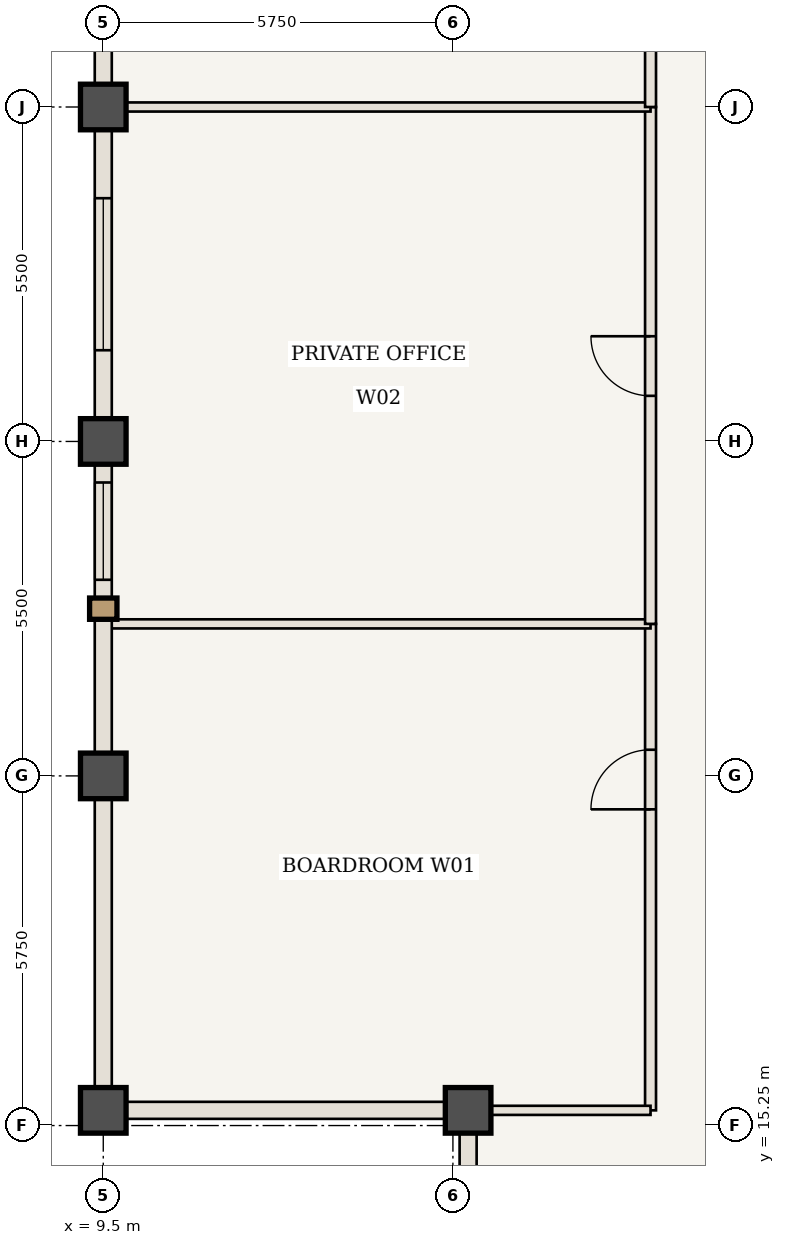
"""IFC4 building model, lengths in metres.
Left out: names, types, materials, properties, quantities, classifications, styles, units other than length and angle.
Written with IfcOpenShell. Run it as: python <this file> out.ifc"""

import sys

from ifc_helpers import new_model, si_unit, direction, frame, frame_2d, origin, origin_2d, place, context, subcontext, project, spatial, rectangle, extrude, element, fill, save


model = new_model("IFC4")
c1 = context("Model", 3, precision=1e-05, world=origin(), true_north=direction((0.0, 1.0)))
c2 = subcontext(c1, "Body", "Model", "MODEL_VIEW")
j1 = project(units=[si_unit("LENGTHUNIT", "METRE"), si_unit("PLANEANGLEUNIT", "RADIAN")], contexts=[c1])
p1 = place(None, origin())
s1 = spatial("IfcSite", under=j1, at=p1, CompositionType="ELEMENT")
p2 = place(p1, origin())
s2 = spatial("IfcBuilding", under=s1, at=p2, CompositionType="ELEMENT")
p3 = place(p2, frame((0.0, 0.0, 266.0)))
s3 = spatial("IfcBuildingStorey", under=s2, at=p3, CompositionType="ELEMENT", Elevation=266.0)
for number, where, z_axis, x_axis in (
    (1, (15.5, 15.5, 0.0), (0.0, 0.0, 1.0), (1.0, 0.0, 0.0)),
    (2, (9.5, 15.5, 0.0), (0.0, 0.0, 1.0), (1.0, 0.0, 0.0)),
    (3, (9.5, 21.0, 0.0), (0.0, 0.0, 1.0), (1.0, 0.0, 0.0)),
    (4, (9.5, 26.5, 0.0), (0.0, 0.0, 1.0), (1.0, 0.0, 0.0)),
    (5, (9.5, 32.0, 0.0), (0.0, 0.0, 1.0), (1.0, 0.0, 0.0)),
):
    element("IfcColumn", number, at=place(p3, frame(where, z_axis=z_axis, x_axis=x_axis)), inside=s3, PredefinedType="COLUMN", context=c2, shape_type="SweptSolid", body=[
        extrude(rectangle(XDim=0.75, YDim=0.75, at=origin_2d()), origin(), (0.0, 0.0, 1.0), 3.85),
    ])
p4 = place(p3, frame((18.5, 15.5, 0.0), z_axis=(0.0, 0.0, 1.0), x_axis=(0.0, 1.0, 0.0)))
e6 = element("IfcWall", 6, at=p4, inside=s3, PredefinedType="STANDARD", context=c2, shape_type="SweptSolid", body=[
    extrude(rectangle(XDim=8.0, YDim=0.18, at=frame_2d((4.0, 0.0))), origin(), (0.0, 0.0, 1.0), 3.685),
])
p5 = place(p4, frame((4.95, 0.0, 0.0)))
e7 = element("IfcOpeningElement", 7, at=p5, cuts=e6, PredefinedType="OPENING", context=c2, shape_type="SweptSolid", body=[
    extrude(rectangle(XDim=0.98, YDim=2.2, at=frame_2d((0.49, 1.1))), frame((0.0, 0.1, 0.0), z_axis=(0.0, -1.0, 0.0), x_axis=(1.0, 0.0, 0.0)), (0.0, 0.0, 1.0), 0.2),
])
p6 = place(p3, frame((9.56, 23.5, 0.0), z_axis=(0.0, 0.0, 1.0), x_axis=(1.0, 0.0, 0.0)))
e8 = element("IfcWall", 8, at=p6, inside=s3, PredefinedType="STANDARD", context=c2, shape_type="SweptSolid", body=[
    extrude(rectangle(XDim=8.94, YDim=0.15, at=frame_2d((4.47, 0.0))), origin(), (0.0, 0.0, 1.0), 3.685),
])
p7 = place(p3, frame((18.5, 23.5, 0.0), z_axis=(0.0, 0.0, 1.0), x_axis=(0.0, 1.0, 0.0)))
e9 = element("IfcWall", 9, at=p7, inside=s3, PredefinedType="STANDARD", context=c2, shape_type="SweptSolid", body=[
    extrude(rectangle(XDim=8.5, YDim=0.18, at=frame_2d((4.25, 0.0))), origin(), (0.0, 0.0, 1.0), 3.685),
])
p8 = place(p7, frame((3.75, 0.0, 0.0)))
e10 = element("IfcOpeningElement", 10, at=p8, cuts=e9, PredefinedType="OPENING", context=c2, shape_type="SweptSolid", body=[
    extrude(rectangle(XDim=0.98, YDim=2.2, at=frame_2d((0.49, 1.1))), frame((0.0, 0.1, 0.0), z_axis=(0.0, -1.0, 0.0), x_axis=(1.0, 0.0, 0.0)), (0.0, 0.0, 1.0), 0.2),
])
p9 = place(p3, frame((9.56, 32.0, 0.0), z_axis=(0.0, 0.0, 1.0), x_axis=(1.0, 0.0, 0.0)))
e11 = element("IfcWall", 11, at=p9, inside=s3, PredefinedType="STANDARD", context=c2, shape_type="SweptSolid", body=[
    extrude(rectangle(XDim=8.94, YDim=0.15, at=frame_2d((4.47, 0.0))), origin(), (0.0, 0.0, 1.0), 3.14),
])
p10 = place(p3, frame((18.5, 32.0, 0.0), z_axis=(0.0, 0.0, 1.0), x_axis=(0.0, 1.0, 0.0)))
e12 = element("IfcWall", 12, at=p10, inside=s3, PredefinedType="STANDARD", context=c2, shape_type="SweptSolid", body=[
    extrude(rectangle(XDim=8.5, YDim=0.18, at=frame_2d((4.25, 0.0))), origin(), (0.0, 0.0, 1.0), 3.685),
])
p11 = place(p10, frame((3.75, 0.0, 0.0)))
e13 = element("IfcOpeningElement", 13, at=p11, cuts=e12, PredefinedType="OPENING", context=c2, shape_type="SweptSolid", body=[
    extrude(rectangle(XDim=0.98, YDim=2.2, at=frame_2d((0.49, 1.1))), frame((0.0, 0.1, 0.0), z_axis=(0.0, -1.0, 0.0), x_axis=(1.0, 0.0, 0.0)), (0.0, 0.0, 1.0), 0.2),
])
p12 = place(p3, frame((15.5, 15.5, 0.0), z_axis=(0.0, 0.0, 1.0), x_axis=(1.0, 0.0, 0.0)))
e14 = element("IfcWall", 14, at=p12, inside=s3, PredefinedType="STANDARD", context=c2, shape_type="SweptSolid", body=[
    extrude(rectangle(XDim=3.0, YDim=0.15, at=frame_2d((1.5, 0.0))), origin(), (0.0, 0.0, 1.0), 3.685),
])
p13 = place(p3, frame((9.5, 15.5, 0.0), z_axis=(0.0, 0.0, 1.0), x_axis=(0.0, 1.0, 0.0)))
e15 = element("IfcWall", 15, at=p13, inside=s3, PredefinedType="USERDEFINED", context=c2, shape_type="SweptSolid", body=[
    extrude(rectangle(XDim=5.5, YDim=0.28, at=frame_2d((2.75, 0.0))), origin(), (0.0, 0.0, 1.0), 2.985),
])
p14 = place(p3, frame((9.5, 21.0, 0.0), z_axis=(0.0, 0.0, 1.0), x_axis=(0.0, 1.0, 0.0)))
e16 = element("IfcWall", 16, at=p14, inside=s3, PredefinedType="USERDEFINED", context=c2, shape_type="SweptSolid", body=[
    extrude(rectangle(XDim=5.5, YDim=0.28, at=frame_2d((2.75, 0.0))), origin(), (0.0, 0.0, 1.0), 2.985),
])
p15 = place(p14, frame((3.225, 0.0, 0.85)))
e17 = element("IfcOpeningElement", 17, at=p15, cuts=e16, PredefinedType="OPENING", context=c2, shape_type="SweptSolid", body=[
    extrude(rectangle(XDim=1.6, YDim=1.935, at=frame_2d((0.8, 0.968))), frame((0.0, 0.15, 0.0), z_axis=(0.0, -1.0, 0.0), x_axis=(1.0, 0.0, 0.0)), (0.0, 0.0, 1.0), 0.3),
])
p16 = place(p3, frame((9.5, 26.5, 0.0), z_axis=(0.0, 0.0, 1.0), x_axis=(0.0, 1.0, 0.0)))
e18 = element("IfcWall", 18, at=p16, inside=s3, PredefinedType="USERDEFINED", context=c2, shape_type="SweptSolid", body=[
    extrude(rectangle(XDim=5.5, YDim=0.28, at=frame_2d((2.75, 0.0))), origin(), (0.0, 0.0, 1.0), 2.985),
])
p17 = place(p16, frame((1.5, 0.0, 0.85)))
e19 = element("IfcOpeningElement", 19, at=p17, cuts=e18, PredefinedType="OPENING", context=c2, shape_type="SweptSolid", body=[
    extrude(rectangle(XDim=2.5, YDim=1.935, at=frame_2d((1.25, 0.968))), frame((0.0, 0.15, 0.0), z_axis=(0.0, -1.0, 0.0), x_axis=(1.0, 0.0, 0.0)), (0.0, 0.0, 1.0), 0.3),
])
p18 = place(p3, frame((9.5, 32.0, 0.0), z_axis=(0.0, 0.0, 1.0), x_axis=(0.0, 1.0, 0.0)))
e20 = element("IfcWall", 20, at=p18, inside=s3, PredefinedType="USERDEFINED", context=c2, shape_type="SweptSolid", body=[
    extrude(rectangle(XDim=5.5, YDim=0.28, at=frame_2d((2.75, 0.0))), origin(), (0.0, 0.0, 1.0), 2.985),
])
p19 = place(p18, frame((1.5, 0.0, 0.85)))
e21 = element("IfcOpeningElement", 21, at=p19, cuts=e20, PredefinedType="OPENING", context=c2, shape_type="SweptSolid", body=[
    extrude(rectangle(XDim=2.5, YDim=1.935, at=frame_2d((1.25, 0.968))), frame((0.0, 0.15, 0.0), z_axis=(0.0, -1.0, 0.0), x_axis=(1.0, 0.0, 0.0)), (0.0, 0.0, 1.0), 0.3),
])
for number, where, z_axis, x_axis in (
    (22, (15.5, 9.5, 0.0), (0.0, 0.0, 1.0), (0.0, 1.0, 0.0)),
    (23, (15.5, 15.5, 0.0), (0.0, 0.0, 1.0), (-1.0, 0.0, 0.0)),
):
    element("IfcWall", number, at=place(p3, frame(where, z_axis=z_axis, x_axis=x_axis)), inside=s3, PredefinedType="USERDEFINED", context=c2, shape_type="SweptSolid", body=[
        extrude(rectangle(XDim=6.0, YDim=0.28, at=frame_2d((3.0, 0.0))), origin(), (0.0, 0.0, 1.0), 2.985),
    ])
p20 = place(p5, origin())
e24 = element("IfcDoor", 24, at=p20, inside=s3, OperationType="SINGLE_SWING_LEFT", PredefinedType="DOOR", context=c2, shape_type="SweptSolid", body=[
    extrude(rectangle(XDim=0.98, YDim=2.2, at=frame_2d((0.49, 1.1))), frame((0.0, 0.025, 0.0), z_axis=(0.0, -1.0, 0.0), x_axis=(1.0, 0.0, 0.0)), (0.0, 0.0, 1.0), 0.05),
])
fill(e7, e24)
p21 = place(p8, origin())
e25 = element("IfcDoor", 25, at=p21, inside=s3, OperationType="SINGLE_SWING_RIGHT", PredefinedType="DOOR", context=c2, shape_type="SweptSolid", body=[
    extrude(rectangle(XDim=0.98, YDim=2.2, at=frame_2d((0.49, 1.1))), frame((0.0, 0.025, 0.0), z_axis=(0.0, -1.0, 0.0), x_axis=(1.0, 0.0, 0.0)), (0.0, 0.0, 1.0), 0.05),
])
fill(e10, e25)
p22 = place(p15, origin())
e26 = element("IfcWindow", 26, at=p22, inside=s3, PartitioningType="SINGLE_PANEL", PredefinedType="WINDOW", context=c2, shape_type="SweptSolid", body=[
    extrude(rectangle(XDim=1.6, YDim=1.935, at=frame_2d((0.8, 0.968))), frame((0.0, 0.03, 0.0), z_axis=(0.0, -1.0, 0.0), x_axis=(1.0, 0.0, 0.0)), (0.0, 0.0, 1.0), 0.06),
])
fill(e17, e26)
p23 = place(p17, origin())
e27 = element("IfcWindow", 27, at=p23, inside=s3, PartitioningType="SINGLE_PANEL", PredefinedType="WINDOW", context=c2, shape_type="SweptSolid", body=[
    extrude(rectangle(XDim=2.5, YDim=1.935, at=frame_2d((1.25, 0.968))), frame((0.0, 0.03, 0.0), z_axis=(0.0, -1.0, 0.0), x_axis=(1.0, 0.0, 0.0)), (0.0, 0.0, 1.0), 0.06),
])
fill(e19, e27)
save(model, sys.argv[1])
